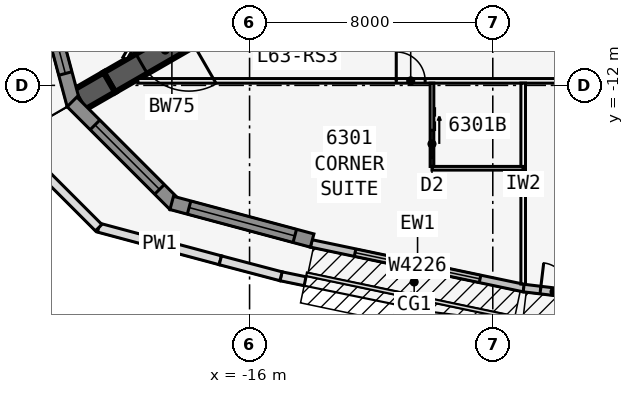
"""IFC4 building model, lengths in metres.
Left out: names, types, materials, properties, quantities, classifications, styles, units other than length and angle.
Written with IfcOpenShell. Run it as: python <this file> out.ifc"""

import sys

from ifc_helpers import new_model, si_unit, direction, frame, frame_2d, origin, place, context, subcontext, project, spatial, polyline, rectangle, outline, extrude, element, fill, save


model = new_model("IFC4")
c1 = context("Model", 3, precision=1e-05, world=origin(), true_north=direction((0.0, 1.0)))
c2 = subcontext(c1, "Body", "Model", "MODEL_VIEW")
j1 = project(units=[si_unit("LENGTHUNIT", "METRE"), si_unit("PLANEANGLEUNIT", "RADIAN")], contexts=[c1])
p1 = place(None, origin())
s1 = spatial("IfcSite", under=j1, at=p1, CompositionType="ELEMENT")
p2 = place(p1, origin())
s2 = spatial("IfcBuilding", under=s1, at=p2, CompositionType="ELEMENT")
p3 = place(p2, frame((0.0, 0.0, 239.3)))
s3 = spatial("IfcBuildingStorey", under=s2, at=p3, CompositionType="ELEMENT", Elevation=239.3)
p4 = place(p3, frame((-16.5, -9.526, 0.0), z_axis=(0.0, 0.0, 1.0), x_axis=(-0.866031398331, -0.499989616998, 0.0)))
e1 = element("IfcWall", 1, at=p4, inside=s3, PredefinedType="SHEAR", context=c2, shape_type="SweptSolid", body=[
    extrude(rectangle(XDim=4.746, YDim=0.75, at=frame_2d((2.373, 0.0))), origin(), (0.0, 0.0, 1.0), 3.6),
])
p5 = place(p4, frame((1.725, 0.0, 0.0)))
e2 = element("IfcOpeningElement", 2, at=p5, cuts=e1, PredefinedType="OPENING", context=c2, shape_type="SweptSolid", body=[
    extrude(rectangle(XDim=1.8, YDim=2.13, at=frame_2d((0.9, 1.065))), frame((0.0, 0.385, 0.0), z_axis=(0.0, -1.0, 0.0), x_axis=(1.0, 0.0, 0.0)), (0.0, 0.0, 1.0), 0.77),
])
p6 = place(p3, frame((-20.61, -11.899, 0.0), z_axis=(0.0, 0.0, 1.0), x_axis=(-0.866009537788, -0.500027479704, 0.0)))
e3 = element("IfcWall", 3, at=p6, inside=s3, PredefinedType="SHEAR", context=c2, shape_type="SweptSolid", body=[
    extrude(rectangle(XDim=1.155, YDim=0.75, at=frame_2d((0.577, 0.0))), origin(), (0.0, 0.0, 1.0), 3.6),
])
p7 = place(p3, frame((-13.974, -17.198, 0.0), z_axis=(0.0, 0.0, 1.0), x_axis=(0.978654320409, -0.205513311355, 0.0)))
e4 = element("IfcWall", 4, at=p7, inside=s3, PredefinedType="STANDARD", context=c2, shape_type="SweptSolid", body=[
    extrude(rectangle(XDim=7.153, YDim=0.25, at=frame_2d((3.576, 0.0))), origin(), (0.0, 0.0, 1.0), 3.435),
])
p8 = place(p7, frame((1.476, 0.0, 0.45)))
e5 = element("IfcOpeningElement", 5, at=p8, cuts=e4, PredefinedType="OPENING", context=c2, shape_type="SweptSolid", body=[
    extrude(rectangle(XDim=4.2, YDim=2.6, at=frame_2d((2.1, 1.3))), frame((0.0, 0.135, 0.0), z_axis=(0.0, -1.0, 0.0), x_axis=(1.0, 0.0, 0.0)), (0.0, 0.0, 1.0), 0.27),
])
p9 = place(p3, frame((-6.985, -18.667, 0.0), z_axis=(0.0, 0.0, 1.0), x_axis=(0.992877411981, -0.119140441403, 0.0)))
e6 = element("IfcWall", 6, at=p9, inside=s3, PredefinedType="STANDARD", context=c2, shape_type="SweptSolid", body=[
    extrude(rectangle(XDim=2.014, YDim=0.25, at=frame_2d((1.007, 0.0))), origin(), (0.0, 0.0, 1.0), 3.435),
])
p10 = place(p9, frame((0.557, 0.0, 0.0)))
e7 = element("IfcOpeningElement", 7, at=p10, cuts=e6, PredefinedType="OPENING", context=c2, shape_type="SweptSolid", body=[
    extrude(rectangle(XDim=0.9, YDim=2.13, at=frame_2d((0.45, 1.065))), frame((0.0, 0.135, 0.0), z_axis=(0.0, -1.0, 0.0), x_axis=(1.0, 0.0, 0.0)), (0.0, 0.0, 1.0), 0.27),
])
p11 = place(p3, frame((-23.02, -8.025, 0.0), z_axis=(0.0, 0.0, 1.0), x_axis=(0.25880328844, -0.965930048136, 0.0)))
e8 = element("IfcWall", 8, at=p11, inside=s3, PredefinedType="SOLIDWALL", context=c2, shape_type="SweptSolid", body=[
    extrude(outline(polyline([(4.782, 0.225), (4.722, 0.225), (4.303, 0.113), (4.273, 0.225), (0.0, 0.225), (0.0, -0.225), (4.782, -0.225), (4.782, 0.225)])), origin(), (0.0, 0.0, 1.0), 3.435),
])
p12 = place(p11, frame((0.711, 0.0, 0.45)))
e9 = element("IfcOpeningElement", 9, at=p12, cuts=e8, PredefinedType="OPENING", context=c2, shape_type="SweptSolid", body=[
    extrude(rectangle(XDim=3.0, YDim=2.6, at=frame_2d((1.5, 1.3))), frame((0.0, 0.235, 0.0), z_axis=(0.0, -1.0, 0.0), x_axis=(1.0, 0.0, 0.0)), (0.0, 0.0, 1.0), 0.47),
])
p13 = place(p3, frame((-21.841, -12.542, 0.0), z_axis=(0.0, 0.0, 1.0), x_axis=(0.707081252484, -0.707132308968, 0.0)))
e10 = element("IfcWall", 10, at=p13, inside=s3, PredefinedType="SOLIDWALL", context=c2, shape_type="SweptSolid", body=[
    extrude(outline(polyline([(4.782, 0.225), (0.509, 0.225), (0.479, 0.113), (0.059, 0.225), (0.0, 0.225), (0.0, -0.225), (4.782, -0.225), (4.782, 0.225)])), origin(), (0.0, 0.0, 1.0), 3.435),
])
p14 = place(p13, frame((1.07, 0.0, 0.45)))
e11 = element("IfcOpeningElement", 11, at=p14, cuts=e10, PredefinedType="OPENING", context=c2, shape_type="SweptSolid", body=[
    extrude(rectangle(XDim=3.0, YDim=2.6, at=frame_2d((1.5, 1.3))), frame((0.0, 0.235, 0.0), z_axis=(0.0, -1.0, 0.0), x_axis=(1.0, 0.0, 0.0)), (0.0, 0.0, 1.0), 0.47),
])
p15 = place(p3, frame((-18.561, -15.865, 0.0), z_axis=(0.0, 0.0, 1.0), x_axis=(0.965913862671, -0.258863689806, 0.0)))
e12 = element("IfcWall", 12, at=p15, inside=s3, PredefinedType="SOLIDWALL", context=c2, shape_type="SweptSolid", body=[
    extrude(rectangle(XDim=4.782, YDim=0.45, at=frame_2d((2.391, 0.0))), origin(), (0.0, 0.0, 1.0), 3.435),
])
p16 = place(p15, frame((0.591, 0.0, 0.45)))
e13 = element("IfcOpeningElement", 13, at=p16, cuts=e12, PredefinedType="OPENING", context=c2, shape_type="SweptSolid", body=[
    extrude(rectangle(XDim=3.6, YDim=2.6, at=frame_2d((1.8, 1.3))), frame((0.0, 0.235, 0.0), z_axis=(0.0, -1.0, 0.0), x_axis=(1.0, 0.0, 0.0)), (0.0, 0.0, 1.0), 0.47),
])
p17 = place(p3, frame((-16.961, -17.753, 0.0), z_axis=(0.0, 0.0, 1.0), x_axis=(-0.965922277207, 0.258832290092, 0.0)))
e14 = element("IfcWall", 14, at=p17, inside=s3, PredefinedType="PARAPET", context=c2, shape_type="SweptSolid", body=[
    extrude(rectangle(XDim=4.144, YDim=0.3, at=frame_2d((2.072, 0.0))), origin(), (0.0, 0.0, 1.0), 1.1),
])
p18 = place(p3, frame((-20.964, -16.68, 0.0), z_axis=(0.0, 0.0, 1.0), x_axis=(-0.707106781187, 0.707106781187, 0.0)))
e15 = element("IfcWall", 15, at=p18, inside=s3, PredefinedType="PARAPET", context=c2, shape_type="SweptSolid", body=[
    extrude(rectangle(XDim=4.104, YDim=0.3, at=frame_2d((2.052, 0.0))), origin(), (0.0, 0.0, 1.0), 1.1),
])
p19 = place(p3, frame((-14.174, -18.442, 0.0), z_axis=(0.0, 0.0, 1.0), x_axis=(-0.979437739826, 0.201746657479, 0.0)))
e16 = element("IfcWall", 16, at=p19, inside=s3, PredefinedType="PARAPET", context=c2, shape_type="SweptSolid", body=[
    extrude(rectangle(XDim=0.808, YDim=0.3, at=frame_2d((0.404, 0.0))), origin(), (0.0, 0.0, 1.0), 1.1),
])
p20 = place(p3, frame((-14.966, -18.279, 0.0), z_axis=(0.0, 0.0, 1.0), x_axis=(-0.966988668416, 0.25481937751, 0.0)))
e17 = element("IfcWall", 17, at=p20, inside=s3, PredefinedType="PARAPET", context=c2, shape_type="SweptSolid", body=[
    extrude(rectangle(XDim=2.064, YDim=0.3, at=frame_2d((1.032, 0.0))), origin(), (0.0, 0.0, 1.0), 1.1),
])
p21 = place(p3, frame((-19.677, -11.851, 0.0), z_axis=(0.0, 0.0, 1.0), x_axis=(1.0, 0.0, 0.0)))
e18 = element("IfcWall", 18, at=p21, inside=s3, PredefinedType="PARTITIONING", context=c2, shape_type="SweptSolid", body=[
    extrude(rectangle(XDim=39.354, YDim=0.15, at=frame_2d((19.677, 0.0))), origin(), (0.0, 0.0, 1.0), 3.435),
])
p22 = place(p21, frame((8.502, 0.0, 0.0)))
e19 = element("IfcOpeningElement", 19, at=p22, cuts=e18, PredefinedType="OPENING", context=c2, shape_type="SweptSolid", body=[
    extrude(rectangle(XDim=0.95, YDim=2.13, at=frame_2d((0.475, 1.065))), frame((0.0, 0.085, 0.0), z_axis=(0.0, -1.0, 0.0), x_axis=(1.0, 0.0, 0.0)), (0.0, 0.0, 1.0), 0.17),
])
p23 = place(p21, frame((15.677, 0.0, 0.0)))
e20 = element("IfcOpeningElement", 20, at=p23, cuts=e18, PredefinedType="OPENING", context=c2, shape_type="SweptSolid", body=[
    extrude(rectangle(XDim=1.0, YDim=2.13, at=frame_2d((0.5, 1.065))), frame((0.0, 0.085, 0.0), z_axis=(0.0, -1.0, 0.0), x_axis=(1.0, 0.0, 0.0)), (0.0, 0.0, 1.0), 0.17),
])
p24 = place(p21, frame((22.902, 0.0, 0.0)))
e21 = element("IfcOpeningElement", 21, at=p24, cuts=e18, PredefinedType="OPENING", context=c2, shape_type="SweptSolid", body=[
    extrude(rectangle(XDim=0.95, YDim=2.13, at=frame_2d((0.475, 1.065))), frame((0.0, 0.085, 0.0), z_axis=(0.0, -1.0, 0.0), x_axis=(1.0, 0.0, 0.0)), (0.0, 0.0, 1.0), 0.17),
])
p25 = place(p21, frame((29.902, 0.0, 0.0)))
e22 = element("IfcOpeningElement", 22, at=p25, cuts=e18, PredefinedType="OPENING", context=c2, shape_type="SweptSolid", body=[
    extrude(rectangle(XDim=0.95, YDim=2.13, at=frame_2d((0.475, 1.065))), frame((0.0, 0.085, 0.0), z_axis=(0.0, -1.0, 0.0), x_axis=(1.0, 0.0, 0.0)), (0.0, 0.0, 1.0), 0.17),
])
p26 = place(p3, frame((-7.0, -11.926, 0.0), z_axis=(0.0, 0.0, 1.0), x_axis=(0.0, -1.0, 0.0)))
e23 = element("IfcWall", 23, at=p26, inside=s3, PredefinedType="PARTITIONING", context=c2, shape_type="SweptSolid", body=[
    extrude(rectangle(XDim=6.609, YDim=0.15, at=frame_2d((3.304, 0.0))), origin(), (0.0, 0.0, 1.0), 2.678),
])
p27 = place(p3, frame((-10.0, -14.726, 0.0), z_axis=(0.0, 0.0, 1.0), x_axis=(1.0, 0.0, 0.0)))
e24 = element("IfcWall", 24, at=p27, inside=s3, PredefinedType="PLUMBINGWALL", context=c2, shape_type="SweptSolid", body=[
    extrude(rectangle(XDim=3.0, YDim=0.12, at=frame_2d((1.5, 0.0))), origin(), (0.0, 0.0, 1.0), 3.435),
])
p28 = place(p3, frame((-10.0, -11.926, 0.0), z_axis=(0.0, 0.0, 1.0), x_axis=(0.0, -1.0, 0.0)))
e25 = element("IfcWall", 25, at=p28, inside=s3, PredefinedType="PLUMBINGWALL", context=c2, shape_type="SweptSolid", body=[
    extrude(rectangle(XDim=2.74, YDim=0.12, at=frame_2d((1.37, 0.0))), origin(), (0.0, 0.0, 1.0), 3.435),
])
p29 = place(p28, frame((1.55, 0.0, 0.0)))
e26 = element("IfcOpeningElement", 26, at=p29, cuts=e25, PredefinedType="OPENING", context=c2, shape_type="SweptSolid", body=[
    extrude(rectangle(XDim=0.9, YDim=2.13, at=frame_2d((0.45, 1.065))), frame((0.0, 0.07, 0.0), z_axis=(0.0, -1.0, 0.0), x_axis=(1.0, 0.0, 0.0)), (0.0, 0.0, 1.0), 0.14),
])
p30 = place(p3, frame((-0.425, 22.966, 0.0), z_axis=(0.0, 0.0, 1.0), x_axis=(-0.500000265775, -0.866025250339, 0.0)))
e27 = element("IfcWall", 27, at=p30, inside=s3, PredefinedType="PARTITIONING", context=c2, shape_type="SweptSolid", body=[
    extrude(rectangle(XDim=39.354, YDim=0.15, at=frame_2d((19.677, 0.0))), origin(), (0.0, 0.0, 1.0), 3.435),
])
p31 = place(p30, frame((8.502, 0.0, 0.0)))
e28 = element("IfcOpeningElement", 28, at=p31, cuts=e27, PredefinedType="OPENING", context=c2, shape_type="SweptSolid", body=[
    extrude(rectangle(XDim=0.95, YDim=2.13, at=frame_2d((0.475, 1.065))), frame((0.0, 0.085, 0.0), z_axis=(0.0, -1.0, 0.0), x_axis=(1.0, 0.0, 0.0)), (0.0, 0.0, 1.0), 0.17),
])
p32 = place(p30, frame((15.902, 0.0, 0.0)))
e29 = element("IfcOpeningElement", 29, at=p32, cuts=e27, PredefinedType="OPENING", context=c2, shape_type="SweptSolid", body=[
    extrude(rectangle(XDim=0.95, YDim=2.13, at=frame_2d((0.475, 1.065))), frame((0.0, 0.085, 0.0), z_axis=(0.0, -1.0, 0.0), x_axis=(1.0, 0.0, 0.0)), (0.0, 0.0, 1.0), 0.17),
])
p33 = place(p30, frame((22.902, 0.0, 0.0)))
e30 = element("IfcOpeningElement", 30, at=p33, cuts=e27, PredefinedType="OPENING", context=c2, shape_type="SweptSolid", body=[
    extrude(rectangle(XDim=0.95, YDim=2.13, at=frame_2d((0.475, 1.065))), frame((0.0, 0.085, 0.0), z_axis=(0.0, -1.0, 0.0), x_axis=(1.0, 0.0, 0.0)), (0.0, 0.0, 1.0), 0.17),
])
p34 = place(p30, frame((29.902, 0.0, 0.0)))
e31 = element("IfcOpeningElement", 31, at=p34, cuts=e27, PredefinedType="OPENING", context=c2, shape_type="SweptSolid", body=[
    extrude(rectangle(XDim=0.95, YDim=2.13, at=frame_2d((0.475, 1.065))), frame((0.0, 0.085, 0.0), z_axis=(0.0, -1.0, 0.0), x_axis=(1.0, 0.0, 0.0)), (0.0, 0.0, 1.0), 0.17),
])
p35 = place(p8, origin())
e32 = element("IfcWindow", 32, at=p35, inside=s3, PartitioningType="SINGLE_PANEL", PredefinedType="WINDOW", context=c2, shape_type="SweptSolid", body=[
    extrude(rectangle(XDim=4.2, YDim=2.6, at=frame_2d((2.1, 1.3))), frame((0.0, 0.03, 0.0), z_axis=(0.0, -1.0, 0.0), x_axis=(1.0, 0.0, 0.0)), (0.0, 0.0, 1.0), 0.06),
])
fill(e5, e32)
p36 = place(p10, origin())
e33 = element("IfcDoor", 33, at=p36, inside=s3, OperationType="SINGLE_SWING_LEFT", PredefinedType="DOOR", context=c2, shape_type="SweptSolid", body=[
    extrude(rectangle(XDim=0.9, YDim=2.13, at=frame_2d((0.45, 1.065))), frame((0.0, 0.025, 0.0), z_axis=(0.0, -1.0, 0.0), x_axis=(1.0, 0.0, 0.0)), (0.0, 0.0, 1.0), 0.05),
])
fill(e7, e33)
p37 = place(p12, origin())
e34 = element("IfcWindow", 34, at=p37, inside=s3, PartitioningType="SINGLE_PANEL", PredefinedType="WINDOW", context=c2, shape_type="SweptSolid", body=[
    extrude(rectangle(XDim=3.0, YDim=2.6, at=frame_2d((1.5, 1.3))), frame((0.0, 0.03, 0.0), z_axis=(0.0, -1.0, 0.0), x_axis=(1.0, 0.0, 0.0)), (0.0, 0.0, 1.0), 0.06),
])
fill(e9, e34)
p38 = place(p14, origin())
e35 = element("IfcWindow", 35, at=p38, inside=s3, PartitioningType="SINGLE_PANEL", PredefinedType="WINDOW", context=c2, shape_type="SweptSolid", body=[
    extrude(rectangle(XDim=3.0, YDim=2.6, at=frame_2d((1.5, 1.3))), frame((0.0, 0.03, 0.0), z_axis=(0.0, -1.0, 0.0), x_axis=(1.0, 0.0, 0.0)), (0.0, 0.0, 1.0), 0.06),
])
fill(e11, e35)
p39 = place(p16, origin())
e36 = element("IfcWindow", 36, at=p39, inside=s3, PartitioningType="SINGLE_PANEL", PredefinedType="WINDOW", context=c2, shape_type="SweptSolid", body=[
    extrude(rectangle(XDim=3.6, YDim=2.6, at=frame_2d((1.8, 1.3))), frame((0.0, 0.03, 0.0), z_axis=(0.0, -1.0, 0.0), x_axis=(1.0, 0.0, 0.0)), (0.0, 0.0, 1.0), 0.06),
])
fill(e13, e36)
p40 = place(p29, origin())
e37 = element("IfcDoor", 37, at=p40, inside=s3, OperationType="SLIDING_TO_LEFT", PredefinedType="DOOR", context=c2, shape_type="SweptSolid", body=[
    extrude(rectangle(XDim=0.9, YDim=2.13, at=frame_2d((0.45, 1.065))), frame((0.0, 0.025, 0.0), z_axis=(0.0, -1.0, 0.0), x_axis=(1.0, 0.0, 0.0)), (0.0, 0.0, 1.0), 0.05),
])
fill(e26, e37)
p41 = place(p22, origin())
e38 = element("IfcDoor", 38, at=p41, inside=s3, OperationType="SINGLE_SWING_LEFT", PredefinedType="DOOR", context=c2, shape_type="SweptSolid", body=[
    extrude(rectangle(XDim=0.95, YDim=2.13, at=frame_2d((0.475, 1.065))), frame((0.0, 0.025, 0.0), z_axis=(0.0, -1.0, 0.0), x_axis=(1.0, 0.0, 0.0)), (0.0, 0.0, 1.0), 0.05),
])
fill(e19, e38)
p42 = place(p5, origin())
e39 = element("IfcDoor", 39, at=p42, inside=s3, OperationType="DOUBLE_DOOR_DOUBLE_SWING", PredefinedType="DOOR", context=c2, shape_type="SweptSolid", body=[
    extrude(rectangle(XDim=1.8, YDim=2.13, at=frame_2d((0.9, 1.065))), frame((0.0, 0.025, 0.0), z_axis=(0.0, -1.0, 0.0), x_axis=(1.0, 0.0, 0.0)), (0.0, 0.0, 1.0), 0.05),
])
fill(e2, e39)
save(model, sys.argv[1])
